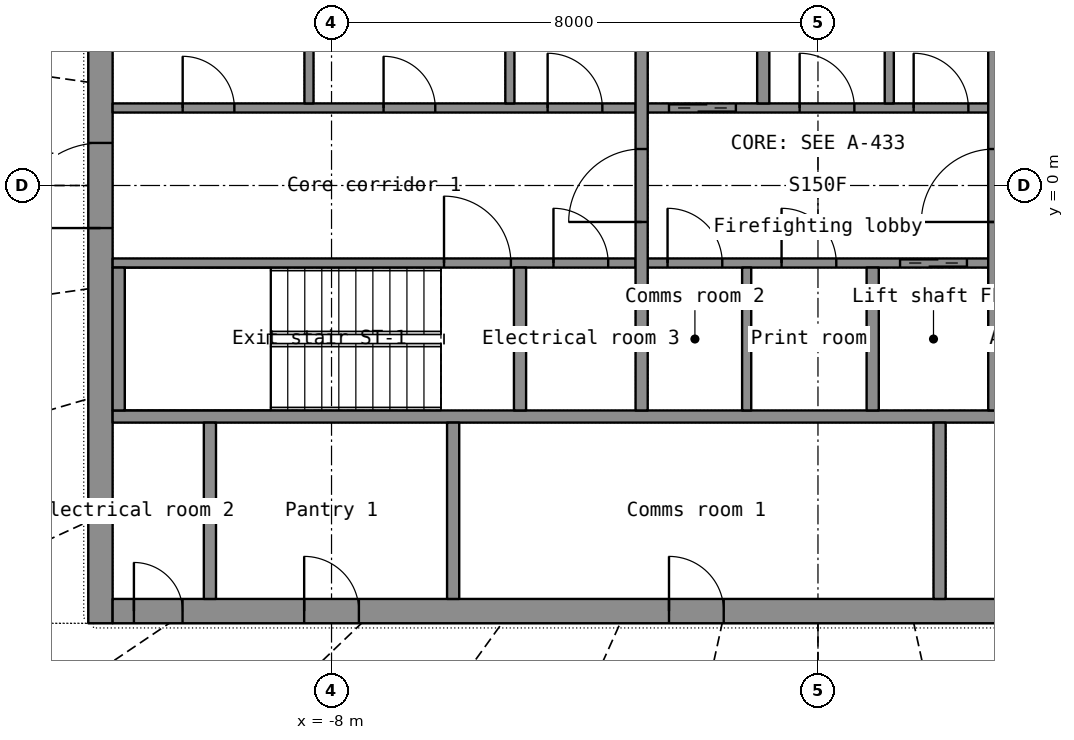
"""IFC4 building model, lengths in metres.
Left out: names, types, materials, properties, quantities, classifications, styles, units other than length and angle.
Written with IfcOpenShell. Run it as: python <this file> out.ifc"""

import sys

from ifc_helpers import new_model, si_unit, direction, frame, frame_2d, origin, place, context, subcontext, project, spatial, rectangle, extrude, element, fill, save


model = new_model("IFC4")
c1 = context("Model", 3, precision=1e-05, world=origin(), true_north=direction((0.0, 1.0)))
c2 = subcontext(c1, "Body", "Model", "MODEL_VIEW")
j1 = project(units=[si_unit("LENGTHUNIT", "METRE"), si_unit("PLANEANGLEUNIT", "RADIAN")], contexts=[c1])
p1 = place(None, origin())
s1 = spatial("IfcSite", under=j1, at=p1, CompositionType="ELEMENT")
p2 = place(p1, origin())
s2 = spatial("IfcBuilding", under=s1, at=p2, CompositionType="ELEMENT")
p3 = place(p2, frame((0.0, 0.0, 261.5)))
s3 = spatial("IfcBuildingStorey", under=s2, at=p3, CompositionType="ELEMENT", Elevation=261.5)
p4 = place(p3, frame((-11.8, -7.2, 0.0), z_axis=(0.0, 0.0, 1.0), x_axis=(0.0, 1.0, 0.0)))
e1 = element("IfcWall", 1, at=p4, inside=s3, PredefinedType="SHEAR", context=c2, shape_type="SweptSolid", body=[
    extrude(rectangle(XDim=14.4, YDim=0.4, at=frame_2d((7.2, 0.0))), origin(), (0.0, 0.0, 1.0), 3.3),
])
p5 = place(p4, frame((6.5, 0.0, 0.0)))
e2 = element("IfcOpeningElement", 2, at=p5, cuts=e1, PredefinedType="OPENING", context=c2, shape_type="SweptSolid", body=[
    extrude(rectangle(XDim=1.4, YDim=2.2, at=frame_2d((0.7, 1.1))), frame((0.0, 0.21, 0.0), z_axis=(0.0, -1.0, 0.0), x_axis=(1.0, 0.0, 0.0)), (0.0, 0.0, 1.0), 0.42),
])
p6 = place(p3, frame((-11.6, -7.0, 0.0), z_axis=(0.0, 0.0, 1.0), x_axis=(1.0, 0.0, 0.0)))
e3 = element("IfcWall", 3, at=p6, inside=s3, PredefinedType="SHEAR", context=c2, shape_type="SweptSolid", body=[
    extrude(rectangle(XDim=23.2, YDim=0.4, at=frame_2d((11.6, 0.0))), origin(), (0.0, 0.0, 1.0), 3.3),
])
p7 = place(p6, frame((20.05, 0.0, 0.0)))
e4 = element("IfcOpeningElement", 4, at=p7, cuts=e3, PredefinedType="OPENING", context=c2, shape_type="SweptSolid", body=[
    extrude(rectangle(XDim=1.1, YDim=2.2, at=frame_2d((0.55, 1.1))), frame((0.0, 0.21, 0.0), z_axis=(0.0, -1.0, 0.0), x_axis=(1.0, 0.0, 0.0)), (0.0, 0.0, 1.0), 0.42),
])
p8 = place(p6, frame((3.15, 0.0, 0.0)))
e5 = element("IfcOpeningElement", 5, at=p8, cuts=e3, PredefinedType="OPENING", context=c2, shape_type="SweptSolid", body=[
    extrude(rectangle(XDim=0.9, YDim=2.1, at=frame_2d((0.45, 1.05))), frame((0.0, 0.21, 0.0), z_axis=(0.0, -1.0, 0.0), x_axis=(1.0, 0.0, 0.0)), (0.0, 0.0, 1.0), 0.42),
])
p9 = place(p6, frame((9.15, 0.0, 0.0)))
e6 = element("IfcOpeningElement", 6, at=p9, cuts=e3, PredefinedType="OPENING", context=c2, shape_type="SweptSolid", body=[
    extrude(rectangle(XDim=0.9, YDim=2.1, at=frame_2d((0.45, 1.05))), frame((0.0, 0.21, 0.0), z_axis=(0.0, -1.0, 0.0), x_axis=(1.0, 0.0, 0.0)), (0.0, 0.0, 1.0), 0.42),
])
p10 = place(p6, frame((16.15, 0.0, 0.0)))
e7 = element("IfcOpeningElement", 7, at=p10, cuts=e3, PredefinedType="OPENING", context=c2, shape_type="SweptSolid", body=[
    extrude(rectangle(XDim=0.9, YDim=2.1, at=frame_2d((0.45, 1.05))), frame((0.0, 0.21, 0.0), z_axis=(0.0, -1.0, 0.0), x_axis=(1.0, 0.0, 0.0)), (0.0, 0.0, 1.0), 0.42),
])
p11 = place(p6, frame((0.35, 0.0, 0.0)))
e8 = element("IfcOpeningElement", 8, at=p11, cuts=e3, PredefinedType="OPENING", context=c2, shape_type="SweptSolid", body=[
    extrude(rectangle(XDim=0.8, YDim=2.05, at=frame_2d((0.4, 1.025))), frame((0.0, 0.21, 0.0), z_axis=(0.0, -1.0, 0.0), x_axis=(1.0, 0.0, 0.0)), (0.0, 0.0, 1.0), 0.42),
])
p12 = place(p6, frame((22.05, 0.0, 0.0)))
e9 = element("IfcOpeningElement", 9, at=p12, cuts=e3, PredefinedType="OPENING", context=c2, shape_type="SweptSolid", body=[
    extrude(rectangle(XDim=0.8, YDim=2.05, at=frame_2d((0.4, 1.025))), frame((0.0, 0.21, 0.0), z_axis=(0.0, -1.0, 0.0), x_axis=(1.0, 0.0, 0.0)), (0.0, 0.0, 1.0), 0.42),
])
p13 = place(p3, frame((-11.6, -3.8, 0.0), z_axis=(0.0, 0.0, 1.0), x_axis=(1.0, 0.0, 0.0)))
e10 = element("IfcWall", 10, at=p13, inside=s3, PredefinedType="SHEAR", context=c2, shape_type="SweptSolid", body=[
    extrude(rectangle(XDim=23.2, YDim=0.2, at=frame_2d((11.6, 0.0))), origin(), (0.0, 0.0, 1.0), 3.3),
])
p14 = place(p3, frame((-10.0, -6.8, 0.0), z_axis=(0.0, 0.0, 1.0), x_axis=(0.0, 1.0, 0.0)))
e11 = element("IfcWall", 11, at=p14, inside=s3, PredefinedType="SHEAR", context=c2, shape_type="SweptSolid", body=[
    extrude(rectangle(XDim=2.9, YDim=0.2, at=frame_2d((1.45, 0.0))), origin(), (0.0, 0.0, 1.0), 3.3),
])
for number, where, z_axis, x_axis in (
    (12, (-6.0, -6.8, 0.0), (0.0, 0.0, 1.0), (0.0, 1.0, 0.0)),
    (13, (2.0, -6.8, 0.0), (0.0, 0.0, 1.0), (0.0, 1.0, 0.0)),
):
    element("IfcWall", number, at=place(p3, frame(where, z_axis=z_axis, x_axis=x_axis)), inside=s3, PredefinedType="PARTITIONING", context=c2, shape_type="SweptSolid", body=[
        extrude(rectangle(XDim=2.9, YDim=0.2, at=frame_2d((1.45, 0.0))), origin(), (0.0, 0.0, 1.0), 3.3),
    ])
p15 = place(p3, frame((-11.6, -1.275, 0.0), z_axis=(0.0, 0.0, 1.0), x_axis=(1.0, 0.0, 0.0)))
e14 = element("IfcWall", 14, at=p15, inside=s3, PredefinedType="SHEAR", context=c2, shape_type="SweptSolid", body=[
    extrude(rectangle(XDim=8.6, YDim=0.15, at=frame_2d((4.3, 0.0))), origin(), (0.0, 0.0, 1.0), 3.3),
])
p16 = place(p15, frame((5.45, 0.0, 0.0)))
e15 = element("IfcOpeningElement", 15, at=p16, cuts=e14, PredefinedType="OPENING", context=c2, shape_type="SweptSolid", body=[
    extrude(rectangle(XDim=1.1, YDim=2.15, at=frame_2d((0.55, 1.075))), frame((0.0, 0.085, 0.0), z_axis=(0.0, -1.0, 0.0), x_axis=(1.0, 0.0, 0.0)), (0.0, 0.0, 1.0), 0.17),
])
p17 = place(p15, frame((7.25, 0.0, 0.0)))
e16 = element("IfcOpeningElement", 16, at=p17, cuts=e14, PredefinedType="OPENING", context=c2, shape_type="SweptSolid", body=[
    extrude(rectangle(XDim=0.9, YDim=2.1, at=frame_2d((0.45, 1.05))), frame((0.0, 0.085, 0.0), z_axis=(0.0, -1.0, 0.0), x_axis=(1.0, 0.0, 0.0)), (0.0, 0.0, 1.0), 0.17),
])
p18 = place(p3, frame((-2.8, -1.275, 0.0), z_axis=(0.0, 0.0, 1.0), x_axis=(1.0, 0.0, 0.0)))
e17 = element("IfcWall", 17, at=p18, inside=s3, PredefinedType="SHEAR", context=c2, shape_type="SweptSolid", body=[
    extrude(rectangle(XDim=5.6, YDim=0.15, at=frame_2d((2.8, 0.0))), origin(), (0.0, 0.0, 1.0), 3.3),
])
p19 = place(p18, frame((4.15, 0.0, 0.0)))
e18 = element("IfcOpeningElement", 18, at=p19, cuts=e17, PredefinedType="OPENING", context=c2, shape_type="SweptSolid", body=[
    extrude(rectangle(XDim=1.1, YDim=2.2, at=frame_2d((0.55, 1.1))), frame((0.0, 0.085, 0.0), z_axis=(0.0, -1.0, 0.0), x_axis=(1.0, 0.0, 0.0)), (0.0, 0.0, 1.0), 0.17),
])
p20 = place(p18, frame((0.326, 0.0, 0.0)))
e19 = element("IfcOpeningElement", 19, at=p20, cuts=e17, PredefinedType="OPENING", context=c2, shape_type="SweptSolid", body=[
    extrude(rectangle(XDim=0.9, YDim=2.1, at=frame_2d((0.45, 1.05))), frame((0.0, 0.085, 0.0), z_axis=(0.0, -1.0, 0.0), x_axis=(1.0, 0.0, 0.0)), (0.0, 0.0, 1.0), 0.17),
])
p21 = place(p18, frame((2.201, 0.0, 0.0)))
e20 = element("IfcOpeningElement", 20, at=p21, cuts=e17, PredefinedType="OPENING", context=c2, shape_type="SweptSolid", body=[
    extrude(rectangle(XDim=0.9, YDim=2.1, at=frame_2d((0.45, 1.05))), frame((0.0, 0.085, 0.0), z_axis=(0.0, -1.0, 0.0), x_axis=(1.0, 0.0, 0.0)), (0.0, 0.0, 1.0), 0.17),
])
p22 = place(p3, frame((-11.6, 1.275, 0.0), z_axis=(0.0, 0.0, 1.0), x_axis=(1.0, 0.0, 0.0)))
e21 = element("IfcWall", 21, at=p22, inside=s3, PredefinedType="PARTITIONING", context=c2, shape_type="SweptSolid", body=[
    extrude(rectangle(XDim=8.6, YDim=0.15, at=frame_2d((4.3, 0.0))), origin(), (0.0, 0.0, 1.0), 3.3),
])
p23 = place(p22, frame((1.152, 0.0, 0.0)))
e22 = element("IfcOpeningElement", 22, at=p23, cuts=e21, PredefinedType="OPENING", context=c2, shape_type="SweptSolid", body=[
    extrude(rectangle(XDim=0.85, YDim=2.1, at=frame_2d((0.425, 1.05))), frame((0.0, 0.085, 0.0), z_axis=(0.0, -1.0, 0.0), x_axis=(1.0, 0.0, 0.0)), (0.0, 0.0, 1.0), 0.17),
])
p24 = place(p22, frame((4.456, 0.0, 0.0)))
e23 = element("IfcOpeningElement", 23, at=p24, cuts=e21, PredefinedType="OPENING", context=c2, shape_type="SweptSolid", body=[
    extrude(rectangle(XDim=0.85, YDim=2.1, at=frame_2d((0.425, 1.05))), frame((0.0, 0.085, 0.0), z_axis=(0.0, -1.0, 0.0), x_axis=(1.0, 0.0, 0.0)), (0.0, 0.0, 1.0), 0.17),
])
p25 = place(p22, frame((7.154, 0.0, 0.0)))
e24 = element("IfcOpeningElement", 24, at=p25, cuts=e21, PredefinedType="OPENING", context=c2, shape_type="SweptSolid", body=[
    extrude(rectangle(XDim=0.9, YDim=2.1, at=frame_2d((0.45, 1.05))), frame((0.0, 0.085, 0.0), z_axis=(0.0, -1.0, 0.0), x_axis=(1.0, 0.0, 0.0)), (0.0, 0.0, 1.0), 0.17),
])
p26 = place(p3, frame((-2.8, 1.275, 0.0), z_axis=(0.0, 0.0, 1.0), x_axis=(1.0, 0.0, 0.0)))
e25 = element("IfcWall", 25, at=p26, inside=s3, PredefinedType="SHEAR", context=c2, shape_type="SweptSolid", body=[
    extrude(rectangle(XDim=5.6, YDim=0.15, at=frame_2d((2.8, 0.0))), origin(), (0.0, 0.0, 1.0), 3.3),
])
p27 = place(p26, frame((0.35, 0.0, 0.0)))
e26 = element("IfcOpeningElement", 26, at=p27, cuts=e25, PredefinedType="OPENING", context=c2, shape_type="SweptSolid", body=[
    extrude(rectangle(XDim=1.1, YDim=2.2, at=frame_2d((0.55, 1.1))), frame((0.0, 0.085, 0.0), z_axis=(0.0, -1.0, 0.0), x_axis=(1.0, 0.0, 0.0)), (0.0, 0.0, 1.0), 0.17),
])
p28 = place(p26, frame((2.499, 0.0, 0.0)))
e27 = element("IfcOpeningElement", 27, at=p28, cuts=e25, PredefinedType="OPENING", context=c2, shape_type="SweptSolid", body=[
    extrude(rectangle(XDim=0.9, YDim=2.1, at=frame_2d((0.45, 1.05))), frame((0.0, 0.085, 0.0), z_axis=(0.0, -1.0, 0.0), x_axis=(1.0, 0.0, 0.0)), (0.0, 0.0, 1.0), 0.17),
])
p29 = place(p26, frame((4.374, 0.0, 0.0)))
e28 = element("IfcOpeningElement", 28, at=p29, cuts=e25, PredefinedType="OPENING", context=c2, shape_type="SweptSolid", body=[
    extrude(rectangle(XDim=0.9, YDim=2.1, at=frame_2d((0.45, 1.05))), frame((0.0, 0.085, 0.0), z_axis=(0.0, -1.0, 0.0), x_axis=(1.0, 0.0, 0.0)), (0.0, 0.0, 1.0), 0.17),
])
p30 = place(p3, frame((-2.9, -3.7, 0.0), z_axis=(0.0, 0.0, 1.0), x_axis=(0.0, 1.0, 0.0)))
e29 = element("IfcWall", 29, at=p30, inside=s3, PredefinedType="SHEAR", context=c2, shape_type="SweptSolid", body=[
    extrude(rectangle(XDim=7.4, YDim=0.2, at=frame_2d((3.7, 0.0))), origin(), (0.0, 0.0, 1.0), 3.3),
])
p31 = place(p30, frame((3.1, 0.0, 0.0)))
e30 = element("IfcOpeningElement", 30, at=p31, cuts=e29, PredefinedType="OPENING", context=c2, shape_type="SweptSolid", body=[
    extrude(rectangle(XDim=1.2, YDim=2.2, at=frame_2d((0.6, 1.1))), frame((0.0, 0.11, 0.0), z_axis=(0.0, -1.0, 0.0), x_axis=(1.0, 0.0, 0.0)), (0.0, 0.0, 1.0), 0.22),
])
p32 = place(p3, frame((2.9, -3.7, 0.0), z_axis=(0.0, 0.0, 1.0), x_axis=(0.0, 1.0, 0.0)))
e31 = element("IfcWall", 31, at=p32, inside=s3, PredefinedType="SHEAR", context=c2, shape_type="SweptSolid", body=[
    extrude(rectangle(XDim=7.4, YDim=0.2, at=frame_2d((3.7, 0.0))), origin(), (0.0, 0.0, 1.0), 3.3),
])
p33 = place(p32, frame((3.1, 0.0, 0.0)))
e32 = element("IfcOpeningElement", 32, at=p33, cuts=e31, PredefinedType="OPENING", context=c2, shape_type="SweptSolid", body=[
    extrude(rectangle(XDim=1.2, YDim=2.2, at=frame_2d((0.6, 1.1))), frame((0.0, 0.11, 0.0), z_axis=(0.0, -1.0, 0.0), x_axis=(1.0, 0.0, 0.0)), (0.0, 0.0, 1.0), 0.22),
])
for number, where, z_axis, x_axis in (
    (33, (-0.9, 1.35, 0.0), (0.0, 0.0, 1.0), (0.0, 1.0, 0.0)),
    (34, (0.9, -3.7, 0.0), (0.0, 0.0, 1.0), (0.0, 1.0, 0.0)),
    (35, (-11.5, -3.7, 0.0), (0.0, 0.0, 1.0), (0.0, 1.0, 0.0)),
    (36, (-4.9, -3.7, 0.0), (0.0, 0.0, 1.0), (0.0, 1.0, 0.0)),
):
    element("IfcWall", number, at=place(p3, frame(where, z_axis=z_axis, x_axis=x_axis)), inside=s3, PredefinedType="SHEAR", context=c2, shape_type="SweptSolid", body=[
        extrude(rectangle(XDim=2.35, YDim=0.2, at=frame_2d((1.175, 0.0))), origin(), (0.0, 0.0, 1.0), 3.3),
    ])
for number, where, z_axis, x_axis in (
    (37, (-8.371, 1.35, 0.0), (0.0, 0.0, 1.0), (0.0, 1.0, 0.0)),
    (38, (-5.067, 1.35, 0.0), (0.0, 0.0, 1.0), (0.0, 1.0, 0.0)),
    (39, (1.173, 1.35, 0.0), (0.0, 0.0, 1.0), (0.0, 1.0, 0.0)),
    (40, (-1.173, -3.7, 0.0), (0.0, 0.0, 1.0), (0.0, 1.0, 0.0)),
):
    element("IfcWall", number, at=place(p3, frame(where, z_axis=z_axis, x_axis=x_axis)), inside=s3, PredefinedType="PARTITIONING", context=c2, shape_type="SweptSolid", body=[
        extrude(rectangle(XDim=2.35, YDim=0.15, at=frame_2d((1.175, 0.0))), origin(), (0.0, 0.0, 1.0), 3.3),
    ])
p34 = place(p8, origin())
e41 = element("IfcDoor", 41, at=p34, inside=s3, OperationType="SINGLE_SWING_LEFT", PredefinedType="DOOR", context=c2, shape_type="SweptSolid", body=[
    extrude(rectangle(XDim=0.9, YDim=2.1, at=frame_2d((0.45, 1.05))), frame((0.0, 0.025, 0.0), z_axis=(0.0, -1.0, 0.0), x_axis=(1.0, 0.0, 0.0)), (0.0, 0.0, 1.0), 0.05),
])
fill(e5, e41)
p35 = place(p9, origin())
e42 = element("IfcDoor", 42, at=p35, inside=s3, OperationType="SINGLE_SWING_LEFT", PredefinedType="DOOR", context=c2, shape_type="SweptSolid", body=[
    extrude(rectangle(XDim=0.9, YDim=2.1, at=frame_2d((0.45, 1.05))), frame((0.0, 0.025, 0.0), z_axis=(0.0, -1.0, 0.0), x_axis=(1.0, 0.0, 0.0)), (0.0, 0.0, 1.0), 0.05),
])
fill(e6, e42)
p36 = place(p11, origin())
e43 = element("IfcDoor", 43, at=p36, inside=s3, OperationType="SINGLE_SWING_LEFT", PredefinedType="DOOR", context=c2, shape_type="SweptSolid", body=[
    extrude(rectangle(XDim=0.8, YDim=2.05, at=frame_2d((0.4, 1.025))), frame((0.0, 0.025, 0.0), z_axis=(0.0, -1.0, 0.0), x_axis=(1.0, 0.0, 0.0)), (0.0, 0.0, 1.0), 0.05),
])
fill(e8, e43)
p37 = place(p5, origin())
e44 = element("IfcDoor", 44, at=p37, inside=s3, OperationType="DOUBLE_DOOR_SINGLE_SWING", PredefinedType="DOOR", context=c2, shape_type="SweptSolid", body=[
    extrude(rectangle(XDim=1.4, YDim=2.2, at=frame_2d((0.7, 1.1))), frame((0.0, 0.025, 0.0), z_axis=(0.0, -1.0, 0.0), x_axis=(1.0, 0.0, 0.0)), (0.0, 0.0, 1.0), 0.05),
])
fill(e2, e44)
p38 = place(p31, origin())
e45 = element("IfcDoor", 45, at=p38, inside=s3, OperationType="SINGLE_SWING_LEFT", PredefinedType="DOOR", context=c2, shape_type="SweptSolid", body=[
    extrude(rectangle(XDim=1.2, YDim=2.2, at=frame_2d((0.6, 1.1))), frame((0.0, 0.025, 0.0), z_axis=(0.0, -1.0, 0.0), x_axis=(1.0, 0.0, 0.0)), (0.0, 0.0, 1.0), 0.05),
])
fill(e30, e45)
p39 = place(p33, origin())
e46 = element("IfcDoor", 46, at=p39, inside=s3, OperationType="SINGLE_SWING_LEFT", PredefinedType="DOOR", context=c2, shape_type="SweptSolid", body=[
    extrude(rectangle(XDim=1.2, YDim=2.2, at=frame_2d((0.6, 1.1))), frame((0.0, 0.025, 0.0), z_axis=(0.0, -1.0, 0.0), x_axis=(1.0, 0.0, 0.0)), (0.0, 0.0, 1.0), 0.05),
])
fill(e32, e46)
p40 = place(p27, origin())
e47 = element("IfcDoor", 47, at=p40, inside=s3, OperationType="DOUBLE_DOOR_SLIDING", PredefinedType="DOOR", context=c2, shape_type="SweptSolid", body=[
    extrude(rectangle(XDim=1.1, YDim=2.2, at=frame_2d((0.55, 1.1))), frame((0.0, 0.025, 0.0), z_axis=(0.0, -1.0, 0.0), x_axis=(1.0, 0.0, 0.0)), (0.0, 0.0, 1.0), 0.05),
])
fill(e26, e47)
p41 = place(p19, origin())
e48 = element("IfcDoor", 48, at=p41, inside=s3, OperationType="DOUBLE_DOOR_SLIDING", PredefinedType="DOOR", context=c2, shape_type="SweptSolid", body=[
    extrude(rectangle(XDim=1.1, YDim=2.2, at=frame_2d((0.55, 1.1))), frame((0.0, 0.025, 0.0), z_axis=(0.0, -1.0, 0.0), x_axis=(1.0, 0.0, 0.0)), (0.0, 0.0, 1.0), 0.05),
])
fill(e18, e48)
p42 = place(p16, origin())
e49 = element("IfcDoor", 49, at=p42, inside=s3, OperationType="SINGLE_SWING_LEFT", PredefinedType="DOOR", context=c2, shape_type="SweptSolid", body=[
    extrude(rectangle(XDim=1.1, YDim=2.15, at=frame_2d((0.55, 1.075))), frame((0.0, 0.025, 0.0), z_axis=(0.0, -1.0, 0.0), x_axis=(1.0, 0.0, 0.0)), (0.0, 0.0, 1.0), 0.05),
])
fill(e15, e49)
p43 = place(p23, origin())
e50 = element("IfcDoor", 50, at=p43, inside=s3, OperationType="SINGLE_SWING_LEFT", PredefinedType="DOOR", context=c2, shape_type="SweptSolid", body=[
    extrude(rectangle(XDim=0.85, YDim=2.1, at=frame_2d((0.425, 1.05))), frame((0.0, 0.025, 0.0), z_axis=(0.0, -1.0, 0.0), x_axis=(1.0, 0.0, 0.0)), (0.0, 0.0, 1.0), 0.05),
])
fill(e22, e50)
p44 = place(p24, origin())
e51 = element("IfcDoor", 51, at=p44, inside=s3, OperationType="SINGLE_SWING_LEFT", PredefinedType="DOOR", context=c2, shape_type="SweptSolid", body=[
    extrude(rectangle(XDim=0.85, YDim=2.1, at=frame_2d((0.425, 1.05))), frame((0.0, 0.025, 0.0), z_axis=(0.0, -1.0, 0.0), x_axis=(1.0, 0.0, 0.0)), (0.0, 0.0, 1.0), 0.05),
])
fill(e23, e51)
p45 = place(p25, origin())
e52 = element("IfcDoor", 52, at=p45, inside=s3, OperationType="SINGLE_SWING_LEFT", PredefinedType="DOOR", context=c2, shape_type="SweptSolid", body=[
    extrude(rectangle(XDim=0.9, YDim=2.1, at=frame_2d((0.45, 1.05))), frame((0.0, 0.025, 0.0), z_axis=(0.0, -1.0, 0.0), x_axis=(1.0, 0.0, 0.0)), (0.0, 0.0, 1.0), 0.05),
])
fill(e24, e52)
p46 = place(p28, origin())
e53 = element("IfcDoor", 53, at=p46, inside=s3, OperationType="SINGLE_SWING_LEFT", PredefinedType="DOOR", context=c2, shape_type="SweptSolid", body=[
    extrude(rectangle(XDim=0.9, YDim=2.1, at=frame_2d((0.45, 1.05))), frame((0.0, 0.025, 0.0), z_axis=(0.0, -1.0, 0.0), x_axis=(1.0, 0.0, 0.0)), (0.0, 0.0, 1.0), 0.05),
])
fill(e27, e53)
p47 = place(p29, origin())
e54 = element("IfcDoor", 54, at=p47, inside=s3, OperationType="SINGLE_SWING_LEFT", PredefinedType="DOOR", context=c2, shape_type="SweptSolid", body=[
    extrude(rectangle(XDim=0.9, YDim=2.1, at=frame_2d((0.45, 1.05))), frame((0.0, 0.025, 0.0), z_axis=(0.0, -1.0, 0.0), x_axis=(1.0, 0.0, 0.0)), (0.0, 0.0, 1.0), 0.05),
])
fill(e28, e54)
p48 = place(p20, origin())
e55 = element("IfcDoor", 55, at=p48, inside=s3, OperationType="SINGLE_SWING_LEFT", PredefinedType="DOOR", context=c2, shape_type="SweptSolid", body=[
    extrude(rectangle(XDim=0.9, YDim=2.1, at=frame_2d((0.45, 1.05))), frame((0.0, 0.025, 0.0), z_axis=(0.0, -1.0, 0.0), x_axis=(1.0, 0.0, 0.0)), (0.0, 0.0, 1.0), 0.05),
])
fill(e19, e55)
p49 = place(p21, origin())
e56 = element("IfcDoor", 56, at=p49, inside=s3, OperationType="SINGLE_SWING_LEFT", PredefinedType="DOOR", context=c2, shape_type="SweptSolid", body=[
    extrude(rectangle(XDim=0.9, YDim=2.1, at=frame_2d((0.45, 1.05))), frame((0.0, 0.025, 0.0), z_axis=(0.0, -1.0, 0.0), x_axis=(1.0, 0.0, 0.0)), (0.0, 0.0, 1.0), 0.05),
])
fill(e20, e56)
p50 = place(p17, origin())
e57 = element("IfcDoor", 57, at=p50, inside=s3, OperationType="SINGLE_SWING_LEFT", PredefinedType="DOOR", context=c2, shape_type="SweptSolid", body=[
    extrude(rectangle(XDim=0.9, YDim=2.1, at=frame_2d((0.45, 1.05))), frame((0.0, 0.025, 0.0), z_axis=(0.0, -1.0, 0.0), x_axis=(1.0, 0.0, 0.0)), (0.0, 0.0, 1.0), 0.05),
])
fill(e16, e57)
save(model, sys.argv[1])
